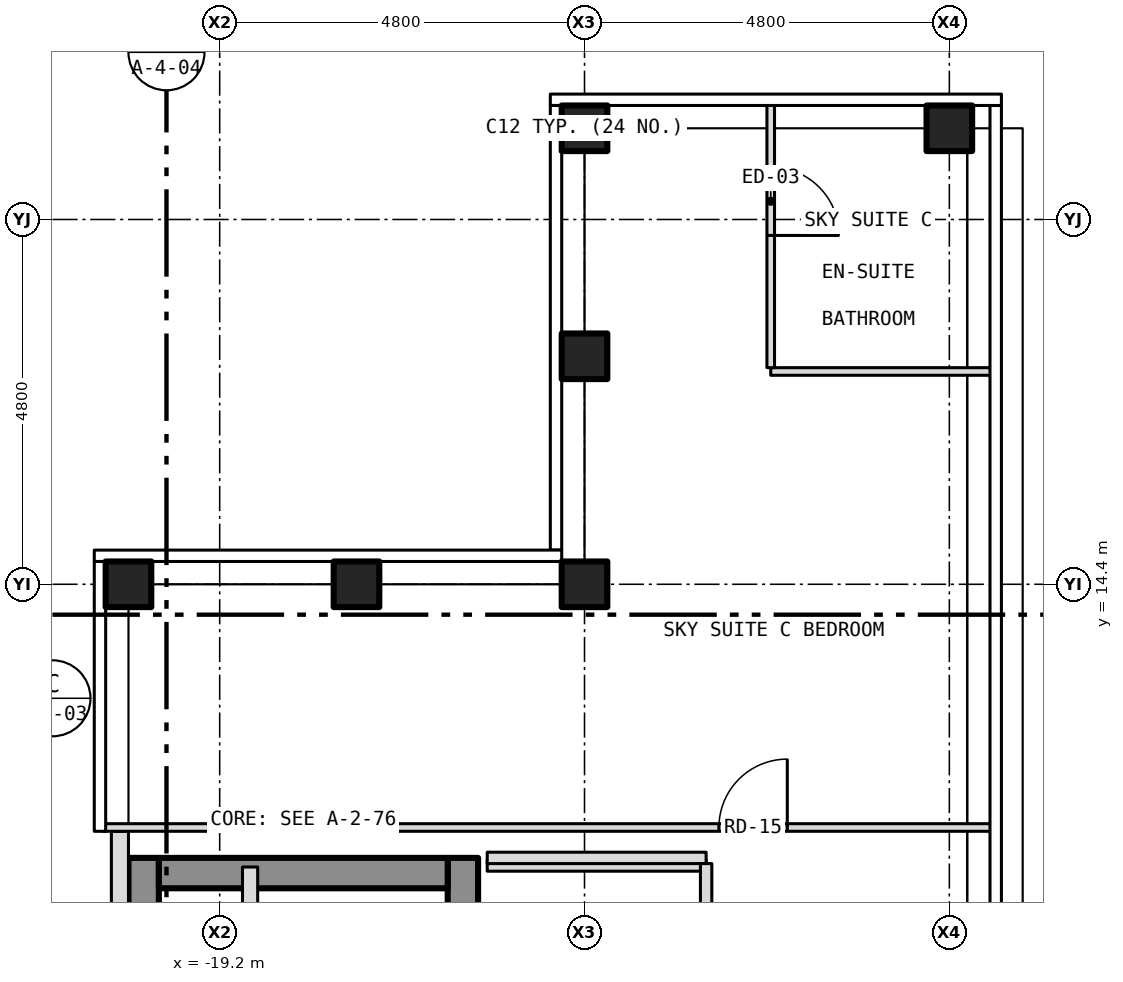
"""IFC4 building model, lengths in metres.
Left out: names, types, materials, properties, quantities, classifications, styles, units other than length and angle.
Written with IfcOpenShell. Run it as: python <this file> out.ifc"""

import sys

from ifc_helpers import new_model, si_unit, direction, frame, frame_2d, origin, origin_2d, place, context, subcontext, project, spatial, rectangle, hollow_rectangle, extrude, element, fill, save


model = new_model("IFC4")
c1 = context("Model", 3, precision=1e-05, world=origin(), true_north=direction((0.0, 1.0)))
c2 = subcontext(c1, "Body", "Model", "MODEL_VIEW")
j1 = project(units=[si_unit("LENGTHUNIT", "METRE"), si_unit("PLANEANGLEUNIT", "RADIAN")], contexts=[c1])
p1 = place(None, origin())
s1 = spatial("IfcSite", under=j1, at=p1, CompositionType="ELEMENT")
p2 = place(p1, origin())
s2 = spatial("IfcBuilding", under=s1, at=p2, CompositionType="ELEMENT")
p3 = place(p2, frame((0.0, 0.0, 276.0)))
s3 = spatial("IfcBuildingStorey", under=s2, at=p3, CompositionType="ELEMENT", Elevation=276.0)
for number, where, z_axis, x_axis in (
    (1, (-14.4, 20.4, -0.15), (0.0, 0.0, 1.0), (1.0, 0.0, 0.0)),
    (2, (-9.6, 20.4, -0.15), (0.0, 0.0, 1.0), (1.0, 0.0, 0.0)),
    (3, (-20.4, 14.4, -0.15), (0.0, 0.0, 1.0), (1.0, 0.0, 0.0)),
    (4, (-14.4, 14.4, -0.15), (0.0, 0.0, 1.0), (1.0, 0.0, 0.0)),
    (5, (-14.4, 17.4, -0.15), (0.0, 0.0, 1.0), (1.0, 0.0, 0.0)),
    (6, (-17.4, 14.4, -0.15), (0.0, 0.0, 1.0), (1.0, 0.0, 0.0)),
):
    element("IfcColumn", number, at=place(p3, frame(where, z_axis=z_axis, x_axis=x_axis)), inside=s3, PredefinedType="COLUMN", context=c2, shape_type="SweptSolid", body=[
        extrude(hollow_rectangle(XDim=0.6, YDim=0.6, WallThickness=0.03, at=origin_2d()), origin(), (0.0, 0.0, 1.0), 3.5),
    ])
p4 = place(p3, frame((-16.0, -10.8, 0.0), z_axis=(0.0, 0.0, 1.0), x_axis=(0.0, 1.0, 0.0)))
e7 = element("IfcWall", 7, at=p4, inside=s3, PredefinedType="SHEAR", context=c2, shape_type="SweptSolid", body=[
    extrude(rectangle(XDim=21.6, YDim=0.4, at=frame_2d((10.8, 0.0))), origin(), (0.0, 0.0, 1.0), 3.25),
])
p5 = place(p4, frame((9.4, 0.0, 0.0)))
e8 = element("IfcOpeningElement", 8, at=p5, cuts=e7, PredefinedType="OPENING", context=c2, shape_type="SweptSolid", body=[
    extrude(rectangle(XDim=1.1, YDim=2.1, at=frame_2d((0.55, 1.05))), frame((0.0, 0.212, 0.0), z_axis=(0.0, -1.0, 0.0), x_axis=(1.0, 0.0, 0.0)), (0.0, 0.0, 1.0), 0.424),
])
p6 = place(p4, frame((11.5, 0.0, 0.0)))
e9 = element("IfcOpeningElement", 9, at=p6, cuts=e7, PredefinedType="OPENING", context=c2, shape_type="SweptSolid", body=[
    extrude(rectangle(XDim=1.1, YDim=2.1, at=frame_2d((0.55, 1.05))), frame((0.0, 0.212, 0.0), z_axis=(0.0, -1.0, 0.0), x_axis=(1.0, 0.0, 0.0)), (0.0, 0.0, 1.0), 0.424),
])
p7 = place(p4, frame((13.6, 0.0, 0.0)))
e10 = element("IfcOpeningElement", 10, at=p7, cuts=e7, PredefinedType="OPENING", context=c2, shape_type="SweptSolid", body=[
    extrude(rectangle(XDim=1.1, YDim=2.1, at=frame_2d((0.55, 1.05))), frame((0.0, 0.212, 0.0), z_axis=(0.0, -1.0, 0.0), x_axis=(1.0, 0.0, 0.0)), (0.0, 0.0, 1.0), 0.424),
])
p8 = place(p4, frame((15.7, 0.0, 0.0)))
e11 = element("IfcOpeningElement", 11, at=p8, cuts=e7, PredefinedType="OPENING", context=c2, shape_type="SweptSolid", body=[
    extrude(rectangle(XDim=1.1, YDim=2.1, at=frame_2d((0.55, 1.05))), frame((0.0, 0.212, 0.0), z_axis=(0.0, -1.0, 0.0), x_axis=(1.0, 0.0, 0.0)), (0.0, 0.0, 1.0), 0.424),
])
p9 = place(p4, frame((17.8, 0.0, 0.0)))
e12 = element("IfcOpeningElement", 12, at=p9, cuts=e7, PredefinedType="OPENING", context=c2, shape_type="SweptSolid", body=[
    extrude(rectangle(XDim=1.1, YDim=2.1, at=frame_2d((0.55, 1.05))), frame((0.0, 0.212, 0.0), z_axis=(0.0, -1.0, 0.0), x_axis=(1.0, 0.0, 0.0)), (0.0, 0.0, 1.0), 0.424),
])
p10 = place(p4, frame((0.458, 0.0, 0.0)))
e13 = element("IfcOpeningElement", 13, at=p10, cuts=e7, PredefinedType="OPENING", context=c2, shape_type="SweptSolid", body=[
    extrude(rectangle(XDim=1.1, YDim=2.1, at=frame_2d((0.55, 1.05))), frame((0.0, 0.212, 0.0), z_axis=(0.0, -1.0, 0.0), x_axis=(1.0, 0.0, 0.0)), (0.0, 0.0, 1.0), 0.424),
])
p11 = place(p4, frame((7.5, 0.0, 0.0)))
e14 = element("IfcOpeningElement", 14, at=p11, cuts=e7, PredefinedType="OPENING", context=c2, shape_type="SweptSolid", body=[
    extrude(rectangle(XDim=1.1, YDim=2.1, at=frame_2d((0.55, 1.05))), frame((0.0, 0.212, 0.0), z_axis=(0.0, -1.0, 0.0), x_axis=(1.0, 0.0, 0.0)), (0.0, 0.0, 1.0), 0.424),
])
p12 = place(p4, frame((20.0, 0.0, 0.0)))
e15 = element("IfcOpeningElement", 15, at=p12, cuts=e7, PredefinedType="OPENING", context=c2, shape_type="SweptSolid", body=[
    extrude(rectangle(XDim=0.9, YDim=2.1, at=frame_2d((0.45, 1.05))), frame((0.0, 0.212, 0.0), z_axis=(0.0, -1.0, 0.0), x_axis=(1.0, 0.0, 0.0)), (0.0, 0.0, 1.0), 0.424),
])
p13 = place(p3, frame((-20.2, -10.8, 0.0), z_axis=(0.0, 0.0, 1.0), x_axis=(0.0, 1.0, 0.0)))
e16 = element("IfcWall", 16, at=p13, inside=s3, PredefinedType="SHEAR", context=c2, shape_type="SweptSolid", body=[
    extrude(rectangle(XDim=21.6, YDim=0.4, at=frame_2d((10.8, 0.0))), origin(), (0.0, 0.0, 1.0), 3.25),
])
p14 = place(p3, frame((-20.0, 10.6, 0.0), z_axis=(0.0, 0.0, 1.0), x_axis=(1.0, 0.0, 0.0)))
e17 = element("IfcWall", 17, at=p14, inside=s3, PredefinedType="SHEAR", context=c2, shape_type="SweptSolid", body=[
    extrude(rectangle(XDim=3.8, YDim=0.4, at=frame_2d((1.9, 0.0))), origin(), (0.0, 0.0, 1.0), 3.25),
])
p15 = place(p3, frame((-20.512, 11.15, 0.0), z_axis=(0.0, 0.0, 1.0), x_axis=(0.0, -1.0, 0.0)))
e18 = element("IfcWall", 18, at=p15, inside=s3, PredefinedType="SOLIDWALL", context=c2, shape_type="SweptSolid", body=[
    extrude(rectangle(XDim=22.3, YDim=0.225, at=frame_2d((11.15, 0.0))), origin(), (0.0, 0.0, 1.0), 3.5),
])
p16 = place(p15, frame((18.4, 0.0, 1.0)))
e19 = element("IfcOpeningElement", 19, at=p16, cuts=e18, PredefinedType="OPENING", context=c2, shape_type="SweptSolid", body=[
    extrude(rectangle(XDim=0.6, YDim=1.5, at=frame_2d((0.3, 0.75))), frame((0.0, 0.125, 0.0), z_axis=(0.0, -1.0, 0.0), x_axis=(1.0, 0.0, 0.0)), (0.0, 0.0, 1.0), 0.249),
])
for number, where, z_axis, x_axis in (
    (20, (-15.68, 10.7, 0.0), (0.0, 0.0, 1.0), (1.0, 0.0, 0.0)),
    (21, (-15.68, 10.8, 0.0), (0.0, 0.0, 1.0), (1.0, 0.0, 0.0)),
):
    element("IfcWall", number, at=place(p3, frame(where, z_axis=z_axis, x_axis=x_axis)), inside=s3, PredefinedType="PARTITIONING", context=c2, shape_type="SweptSolid", body=[
        extrude(rectangle(XDim=2.88, YDim=0.15, at=frame_2d((1.44, 0.0))), origin(), (0.0, 0.0, 1.0), 3.35),
    ])
p17 = place(p3, frame((-20.73, 11.2, 0.0), z_axis=(0.0, 0.0, 1.0), x_axis=(1.0, 0.0, 0.0)))
e22 = element("IfcWall", 22, at=p17, inside=s3, PredefinedType="PARTITIONING", context=c2, shape_type="SweptSolid", body=[
    extrude(rectangle(XDim=11.695, YDim=0.1, at=frame_2d((5.848, 0.0))), origin(), (0.0, 0.0, 1.0), 3.35),
])
p18 = place(p17, frame((8.098, 0.0, 0.0)))
e23 = element("IfcOpeningElement", 23, at=p18, cuts=e22, PredefinedType="OPENING", context=c2, shape_type="SweptSolid", body=[
    extrude(rectangle(XDim=0.9, YDim=2.1, at=frame_2d((0.45, 1.05))), frame((0.0, 0.062, 0.0), z_axis=(0.0, -1.0, 0.0), x_axis=(1.0, 0.0, 0.0)), (0.0, 0.0, 1.0), 0.124),
])
p19 = place(p3, frame((-11.95, 17.2, 0.0), z_axis=(0.0, 0.0, 1.0), x_axis=(1.0, 0.0, 0.0)))
e24 = element("IfcWall", 24, at=p19, inside=s3, PredefinedType="PARTITIONING", context=c2, shape_type="SweptSolid", body=[
    extrude(rectangle(XDim=2.915, YDim=0.1, at=frame_2d((1.458, 0.0))), origin(), (0.0, 0.0, 1.0), 3.35),
])
p20 = place(p3, frame((-18.8, 4.5, 0.0), z_axis=(0.0, 0.0, 1.0), x_axis=(0.0, 1.0, 0.0)))
e25 = element("IfcWall", 25, at=p20, inside=s3, PredefinedType="PARTITIONING", context=c2, shape_type="SweptSolid", body=[
    extrude(rectangle(XDim=6.18, YDim=0.2, at=frame_2d((3.09, 0.0))), origin(), (0.0, 0.0, 1.0), 3.25),
])
p21 = place(p3, frame((-12.8, 2.4, 0.0), z_axis=(0.0, 0.0, 1.0), x_axis=(0.0, 1.0, 0.0)))
e26 = element("IfcWall", 26, at=p21, inside=s3, PredefinedType="PARTITIONING", context=c2, shape_type="SweptSolid", body=[
    extrude(rectangle(XDim=8.325, YDim=0.15, at=frame_2d((4.163, 0.0))), origin(), (0.0, 0.0, 1.0), 3.35),
])
p22 = place(p21, frame((5.585, 0.0, 0.0)))
e27 = element("IfcOpeningElement", 27, at=p22, cuts=e26, PredefinedType="OPENING", context=c2, shape_type="SweptSolid", body=[
    extrude(rectangle(XDim=0.9, YDim=2.1, at=frame_2d((0.45, 1.05))), frame((0.0, 0.087, 0.0), z_axis=(0.0, -1.0, 0.0), x_axis=(1.0, 0.0, 0.0)), (0.0, 0.0, 1.0), 0.174),
])
p23 = place(p3, frame((-11.95, 17.25, 0.0), z_axis=(0.0, 0.0, 1.0), x_axis=(0.0, 1.0, 0.0)))
e28 = element("IfcWall", 28, at=p23, inside=s3, PredefinedType="PARTITIONING", context=c2, shape_type="SweptSolid", body=[
    extrude(rectangle(XDim=3.48, YDim=0.1, at=frame_2d((1.74, 0.0))), origin(), (0.0, 0.0, 1.0), 3.35),
])
p24 = place(p23, frame((1.74, 0.0, 0.0)))
e29 = element("IfcOpeningElement", 29, at=p24, cuts=e28, PredefinedType="OPENING", context=c2, shape_type="SweptSolid", body=[
    extrude(rectangle(XDim=0.9, YDim=2.1, at=frame_2d((0.45, 1.05))), frame((0.0, 0.062, 0.0), z_axis=(0.0, -1.0, 0.0), x_axis=(1.0, 0.0, 0.0)), (0.0, 0.0, 1.0), 0.124),
])
p25 = place(p18, origin())
e30 = element("IfcDoor", 30, at=p25, inside=s3, OperationType="SINGLE_SWING_RIGHT", PredefinedType="DOOR", context=c2, shape_type="SweptSolid", body=[
    extrude(rectangle(XDim=0.9, YDim=2.1, at=frame_2d((0.45, 1.05))), frame((0.0, 0.025, 0.0), z_axis=(0.0, -1.0, 0.0), x_axis=(1.0, 0.0, 0.0)), (0.0, 0.0, 1.0), 0.05),
])
fill(e23, e30)
p26 = place(p24, origin())
e31 = element("IfcDoor", 31, at=p26, inside=s3, OperationType="SINGLE_SWING_LEFT", PredefinedType="DOOR", context=c2, shape_type="SweptSolid", body=[
    extrude(rectangle(XDim=0.9, YDim=2.1, at=frame_2d((0.45, 1.05))), frame((0.0, 0.025, 0.0), z_axis=(0.0, -1.0, 0.0), x_axis=(1.0, 0.0, 0.0)), (0.0, 0.0, 1.0), 0.05),
])
fill(e29, e31)
save(model, sys.argv[1])
